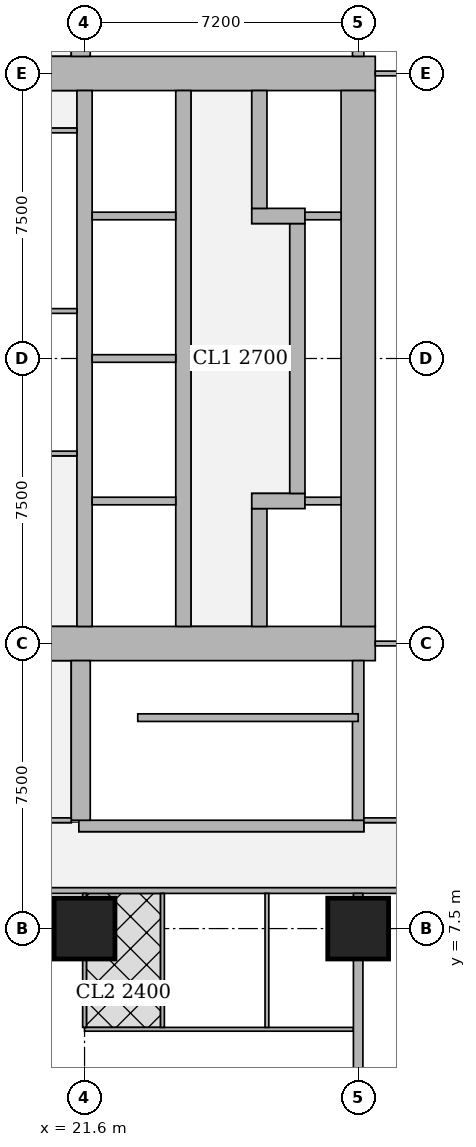
"""IFC4 building model, lengths in metres.
Left out: names, types, materials, properties, quantities, classifications, styles, units other than length and angle.
Written with IfcOpenShell. Run it as: python <this file> out.ifc"""

import sys

from ifc_helpers import new_model, si_unit, direction, frame, frame_2d, origin, origin_2d, place, context, subcontext, project, spatial, rectangle, extrude, element, fill, save


model = new_model("IFC4")
c1 = context("Model", 3, precision=1e-05, world=origin(), true_north=direction((0.0, 1.0)))
c2 = subcontext(c1, "Body", "Model", "MODEL_VIEW")
j1 = project(units=[si_unit("LENGTHUNIT", "METRE"), si_unit("PLANEANGLEUNIT", "RADIAN")], contexts=[c1])
p1 = place(None, origin())
s1 = spatial("IfcSite", under=j1, at=p1, CompositionType="ELEMENT")
p2 = place(p1, origin())
s2 = spatial("IfcBuilding", under=s1, at=p2, CompositionType="ELEMENT")
p3 = place(p2, frame((0.0, 0.0, 111.65)))
s3 = spatial("IfcBuildingStorey", under=s2, at=p3, CompositionType="ELEMENT", Elevation=111.65)
for number, where, z_axis, x_axis in (
    (1, (21.6, 7.5, 0.0), (0.0, 0.0, 1.0), (1.0, 0.0, 0.0)),
    (2, (28.8, 7.5, 0.0), (0.0, 0.0, 1.0), (1.0, 0.0, 0.0)),
):
    element("IfcColumn", number, at=place(p3, frame(where, z_axis=z_axis, x_axis=x_axis)), inside=s3, PredefinedType="COLUMN", context=c2, shape_type="SweptSolid", body=[
        extrude(rectangle(XDim=1.6, YDim=1.6, at=origin_2d()), origin(), (0.0, 0.0, 1.0), 3.75),
    ])
p4 = place(p3, frame((13.95, 15.0, 0.0), z_axis=(0.0, 0.0, 1.0), x_axis=(1.0, 0.0, 0.0)))
e3 = element("IfcWall", 3, at=p4, inside=s3, PredefinedType="SHEAR", context=c2, shape_type="SweptSolid", body=[
    extrude(rectangle(XDim=15.3, YDim=0.9, at=frame_2d((7.65, 0.0))), origin(), (0.0, 0.0, 1.0), 3.75),
])
p5 = place(p4, frame((4.45, 0.0, 0.0)))
e4 = element("IfcOpeningElement", 4, at=p5, cuts=e3, PredefinedType="OPENING", context=c2, shape_type="SweptSolid", body=[
    extrude(rectangle(XDim=1.8, YDim=2.1, at=frame_2d((0.9, 1.05))), frame((0.0, 0.46, 0.0), z_axis=(0.0, -1.0, 0.0), x_axis=(1.0, 0.0, 0.0)), (0.0, 0.0, 1.0), 0.92),
])
p6 = place(p4, frame((10.7, 0.0, 0.0)))
e5 = element("IfcOpeningElement", 5, at=p6, cuts=e3, PredefinedType="OPENING", context=c2, shape_type="SweptSolid", body=[
    extrude(rectangle(XDim=1.1, YDim=2.1, at=frame_2d((0.55, 1.05))), frame((0.0, 0.46, 0.0), z_axis=(0.0, -1.0, 0.0), x_axis=(1.0, 0.0, 0.0)), (0.0, 0.0, 1.0), 0.92),
])
p7 = place(p3, frame((13.95, 30.0, 0.0), z_axis=(0.0, 0.0, 1.0), x_axis=(1.0, 0.0, 0.0)))
e6 = element("IfcWall", 6, at=p7, inside=s3, PredefinedType="SHEAR", context=c2, shape_type="SweptSolid", body=[
    extrude(rectangle(XDim=15.3, YDim=0.9, at=frame_2d((7.65, 0.0))), origin(), (0.0, 0.0, 1.0), 3.75),
])
p8 = place(p7, frame((4.45, 0.0, 0.0)))
e7 = element("IfcOpeningElement", 7, at=p8, cuts=e6, PredefinedType="OPENING", context=c2, shape_type="SweptSolid", body=[
    extrude(rectangle(XDim=1.8, YDim=2.1, at=frame_2d((0.9, 1.05))), frame((0.0, 0.46, 0.0), z_axis=(0.0, -1.0, 0.0), x_axis=(1.0, 0.0, 0.0)), (0.0, 0.0, 1.0), 0.92),
])
p9 = place(p7, frame((10.7, 0.0, 0.0)))
e8 = element("IfcOpeningElement", 8, at=p9, cuts=e6, PredefinedType="OPENING", context=c2, shape_type="SweptSolid", body=[
    extrude(rectangle(XDim=1.1, YDim=2.1, at=frame_2d((0.55, 1.05))), frame((0.0, 0.46, 0.0), z_axis=(0.0, -1.0, 0.0), x_axis=(1.0, 0.0, 0.0)), (0.0, 0.0, 1.0), 0.92),
])
p10 = place(p3, frame((28.8, 15.45, 0.0), z_axis=(0.0, 0.0, 1.0), x_axis=(0.0, 1.0, 0.0)))
e9 = element("IfcWall", 9, at=p10, inside=s3, PredefinedType="SHEAR", context=c2, shape_type="SweptSolid", body=[
    extrude(rectangle(XDim=14.1, YDim=0.9, at=frame_2d((7.05, 0.0))), origin(), (0.0, 0.0, 1.0), 3.75),
])
for number, where, z_axis, x_axis in (
    (10, (21.6, 15.45, 0.0), (0.0, 0.0, 1.0), (0.0, 1.0, 0.0)),
    (11, (24.2, 15.45, 0.0), (0.0, 0.0, 1.0), (0.0, 1.0, 0.0)),
):
    element("IfcWall", number, at=place(p3, frame(where, z_axis=z_axis, x_axis=x_axis)), inside=s3, PredefinedType="SHEAR", context=c2, shape_type="SweptSolid", body=[
        extrude(rectangle(XDim=14.1, YDim=0.4, at=frame_2d((7.05, 0.0))), origin(), (0.0, 0.0, 1.0), 3.75),
    ])
p11 = place(p3, frame((26.2, 15.45, 0.0), z_axis=(0.0, 0.0, 1.0), x_axis=(0.0, 1.0, 0.0)))
e12 = element("IfcWall", 12, at=p11, inside=s3, PredefinedType="SHEAR", context=c2, shape_type="SweptSolid", body=[
    extrude(rectangle(XDim=3.1, YDim=0.4, at=frame_2d((1.55, 0.0))), origin(), (0.0, 0.0, 1.0), 3.75),
])
p12 = place(p11, frame((0.825, 0.0, 0.0)))
e13 = element("IfcOpeningElement", 13, at=p12, cuts=e12, PredefinedType="OPENING", context=c2, shape_type="SweptSolid", body=[
    extrude(rectangle(XDim=1.2, YDim=2.1, at=frame_2d((0.6, 1.05))), frame((0.0, 0.21, 0.0), z_axis=(0.0, -1.0, 0.0), x_axis=(1.0, 0.0, 0.0)), (0.0, 0.0, 1.0), 0.42),
])
p13 = place(p3, frame((26.0, 18.75, 0.0), z_axis=(0.0, 0.0, 1.0), x_axis=(1.0, 0.0, 0.0)))
e14 = element("IfcWall", 14, at=p13, inside=s3, PredefinedType="SHEAR", context=c2, shape_type="SweptSolid", body=[
    extrude(rectangle(XDim=1.4, YDim=0.4, at=frame_2d((0.7, 0.0))), origin(), (0.0, 0.0, 1.0), 3.75),
])
p14 = place(p3, frame((27.2, 18.95, 0.0), z_axis=(0.0, 0.0, 1.0), x_axis=(0.0, 1.0, 0.0)))
e15 = element("IfcWall", 15, at=p14, inside=s3, PredefinedType="SHEAR", context=c2, shape_type="SweptSolid", body=[
    extrude(rectangle(XDim=7.1, YDim=0.4, at=frame_2d((3.55, 0.0))), origin(), (0.0, 0.0, 1.0), 3.75),
])
p15 = place(p3, frame((26.0, 26.25, 0.0), z_axis=(0.0, 0.0, 1.0), x_axis=(1.0, 0.0, 0.0)))
e16 = element("IfcWall", 16, at=p15, inside=s3, PredefinedType="SHEAR", context=c2, shape_type="SweptSolid", body=[
    extrude(rectangle(XDim=1.4, YDim=0.4, at=frame_2d((0.7, 0.0))), origin(), (0.0, 0.0, 1.0), 3.75),
])
p16 = place(p3, frame((26.2, 26.45, 0.0), z_axis=(0.0, 0.0, 1.0), x_axis=(0.0, 1.0, 0.0)))
e17 = element("IfcWall", 17, at=p16, inside=s3, PredefinedType="SHEAR", context=c2, shape_type="SweptSolid", body=[
    extrude(rectangle(XDim=3.1, YDim=0.4, at=frame_2d((1.55, 0.0))), origin(), (0.0, 0.0, 1.0), 3.75),
])
p17 = place(p16, frame((1.075, 0.0, 0.0)))
e18 = element("IfcOpeningElement", 18, at=p17, cuts=e17, PredefinedType="OPENING", context=c2, shape_type="SweptSolid", body=[
    extrude(rectangle(XDim=1.2, YDim=2.1, at=frame_2d((0.6, 1.05))), frame((0.0, 0.21, 0.0), z_axis=(0.0, -1.0, 0.0), x_axis=(1.0, 0.0, 0.0)), (0.0, 0.0, 1.0), 0.42),
])
p18 = place(p3, frame((21.45, 10.2, 0.0), z_axis=(0.0, 0.0, 1.0), x_axis=(1.0, 0.0, 0.0)))
e19 = element("IfcWall", 19, at=p18, inside=s3, PredefinedType="SHEAR", context=c2, shape_type="SweptSolid", body=[
    extrude(rectangle(XDim=7.5, YDim=0.3, at=frame_2d((3.75, 0.0))), origin(), (0.0, 0.0, 1.0), 3.75),
])
p19 = place(p18, frame((0.5, 0.0, 0.0)))
e20 = element("IfcOpeningElement", 20, at=p19, cuts=e19, PredefinedType="OPENING", context=c2, shape_type="SweptSolid", body=[
    extrude(rectangle(XDim=1.1, YDim=2.1, at=frame_2d((0.55, 1.05))), frame((0.0, 0.16, 0.0), z_axis=(0.0, -1.0, 0.0), x_axis=(1.0, 0.0, 0.0)), (0.0, 0.0, 1.0), 0.32),
])
p20 = place(p3, frame((21.5, 10.35, 0.0), z_axis=(0.0, 0.0, 1.0), x_axis=(0.0, 1.0, 0.0)))
e21 = element("IfcWall", 21, at=p20, inside=s3, PredefinedType="SHEAR", context=c2, shape_type="SweptSolid", body=[
    extrude(rectangle(XDim=4.2, YDim=0.5, at=frame_2d((2.1, 0.0))), origin(), (0.0, 0.0, 1.0), 3.75),
])
p21 = place(p3, frame((28.8, 10.35, 0.0), z_axis=(0.0, 0.0, 1.0), x_axis=(0.0, 1.0, 0.0)))
e22 = element("IfcWall", 22, at=p21, inside=s3, PredefinedType="SHEAR", context=c2, shape_type="SweptSolid", body=[
    extrude(rectangle(XDim=4.2, YDim=0.3, at=frame_2d((2.1, 0.0))), origin(), (0.0, 0.0, 1.0), 3.75),
])
p22 = place(p3, frame((21.5, 30.45, 0.0), z_axis=(0.0, 0.0, 1.0), x_axis=(0.0, 1.0, 0.0)))
e23 = element("IfcWall", 23, at=p22, inside=s3, PredefinedType="SHEAR", context=c2, shape_type="SweptSolid", body=[
    extrude(rectangle(XDim=4.2, YDim=0.5, at=frame_2d((2.1, 0.0))), origin(), (0.0, 0.0, 1.0), 3.75),
])
p23 = place(p3, frame((28.8, 30.45, 0.0), z_axis=(0.0, 0.0, 1.0), x_axis=(0.0, 1.0, 0.0)))
e24 = element("IfcWall", 24, at=p23, inside=s3, PredefinedType="SHEAR", context=c2, shape_type="SweptSolid", body=[
    extrude(rectangle(XDim=4.2, YDim=0.3, at=frame_2d((2.1, 0.0))), origin(), (0.0, 0.0, 1.0), 3.75),
])
p24 = place(p3, frame((40.053, 8.5, 0.0), z_axis=(0.0, 0.0, 1.0), x_axis=(-1.0, 0.0, 0.0)))
e25 = element("IfcWall", 25, at=p24, inside=s3, PredefinedType="SOLIDWALL", context=c2, shape_type="SweptSolid", body=[
    extrude(rectangle(XDim=31.703, YDim=0.15, at=frame_2d((15.852, 0.0))), origin(), (0.0, 0.0, 1.0), 3.5),
])
p25 = place(p24, frame((28.103, 0.0, 0.0)))
e26 = element("IfcOpeningElement", 26, at=p25, cuts=e25, PredefinedType="OPENING", context=c2, shape_type="SweptSolid", body=[
    extrude(rectangle(XDim=1.0, YDim=2.1, at=frame_2d((0.5, 1.05))), frame((0.0, 0.085, 0.0), z_axis=(0.0, -1.0, 0.0), x_axis=(1.0, 0.0, 0.0)), (0.0, 0.0, 1.0), 0.17),
])
p26 = place(p24, frame((19.754, 0.0, 0.0)))
e27 = element("IfcOpeningElement", 27, at=p26, cuts=e25, PredefinedType="OPENING", context=c2, shape_type="SweptSolid", body=[
    extrude(rectangle(XDim=1.0, YDim=2.1, at=frame_2d((0.5, 1.05))), frame((0.0, 0.085, 0.0), z_axis=(0.0, -1.0, 0.0), x_axis=(1.0, 0.0, 0.0)), (0.0, 0.0, 1.0), 0.17),
])
p27 = place(p24, frame((8.353, 0.0, 0.0)))
e28 = element("IfcOpeningElement", 28, at=p27, cuts=e25, PredefinedType="OPENING", context=c2, shape_type="SweptSolid", body=[
    extrude(rectangle(XDim=1.0, YDim=2.1, at=frame_2d((0.5, 1.05))), frame((0.0, 0.085, 0.0), z_axis=(0.0, -1.0, 0.0), x_axis=(1.0, 0.0, 0.0)), (0.0, 0.0, 1.0), 0.17),
])
p28 = place(p3, frame((28.675, 4.85, 0.0), z_axis=(0.0, 0.0, 1.0), x_axis=(-1.0, 0.0, 0.0)))
e29 = element("IfcWall", 29, at=p28, inside=s3, PredefinedType="PARTITIONING", context=c2, shape_type="SweptSolid", body=[
    extrude(rectangle(XDim=7.075, YDim=0.1, at=frame_2d((3.538, 0.0))), origin(), (0.0, 0.0, 1.0), 3.5),
])
p29 = place(p28, frame((5.6, 0.0, 0.0)))
e30 = element("IfcOpeningElement", 30, at=p29, cuts=e29, PredefinedType="OPENING", context=c2, shape_type="SweptSolid", body=[
    extrude(rectangle(XDim=0.9, YDim=2.1, at=frame_2d((0.45, 1.05))), frame((0.0, 0.06, 0.0), z_axis=(0.0, -1.0, 0.0), x_axis=(1.0, 0.0, 0.0)), (0.0, 0.0, 1.0), 0.12),
])
p30 = place(p28, frame((0.626, 0.0, 0.0)))
e31 = element("IfcOpeningElement", 31, at=p30, cuts=e29, PredefinedType="OPENING", context=c2, shape_type="SweptSolid", body=[
    extrude(rectangle(XDim=0.9, YDim=2.1, at=frame_2d((0.45, 1.05))), frame((0.0, 0.06, 0.0), z_axis=(0.0, -1.0, 0.0), x_axis=(1.0, 0.0, 0.0)), (0.0, 0.0, 1.0), 0.12),
])
p31 = place(p28, frame((3.201, 0.0, 0.0)))
e32 = element("IfcOpeningElement", 32, at=p31, cuts=e29, PredefinedType="OPENING", context=c2, shape_type="SweptSolid", body=[
    extrude(rectangle(XDim=0.9, YDim=2.1, at=frame_2d((0.45, 1.05))), frame((0.0, 0.06, 0.0), z_axis=(0.0, -1.0, 0.0), x_axis=(1.0, 0.0, 0.0)), (0.0, 0.0, 1.0), 0.12),
])
p32 = place(p3, frame((21.6, 4.9, 0.0), z_axis=(0.0, 0.0, 1.0), x_axis=(0.0, 1.0, 0.0)))
e33 = element("IfcWall", 33, at=p32, inside=s3, PredefinedType="PARTITIONING", context=c2, shape_type="SweptSolid", body=[
    extrude(rectangle(XDim=1.799, YDim=0.1, at=frame_2d((0.899, 0.0))), origin(), (0.0, 0.0, 1.0), 3.5),
])
p33 = place(p3, frame((21.6, 8.301, 0.0), z_axis=(0.0, 0.0, 1.0), x_axis=(0.0, 1.0, 0.0)))
e34 = element("IfcWall", 34, at=p33, inside=s3, PredefinedType="PARTITIONING", context=c2, shape_type="SweptSolid", body=[
    extrude(rectangle(XDim=0.124, YDim=0.1, at=frame_2d((0.062, 0.0))), origin(), (0.0, 0.0, 1.0), 3.5),
])
for number, where, z_axis, x_axis in (
    (35, (26.399, 4.9, 0.0), (0.0, 0.0, 1.0), (0.0, 1.0, 0.0)),
    (36, (23.65, 4.9, 0.0), (0.0, 0.0, 1.0), (0.0, 1.0, 0.0)),
):
    element("IfcWall", number, at=place(p3, frame(where, z_axis=z_axis, x_axis=x_axis)), inside=s3, PredefinedType="PARTITIONING", context=c2, shape_type="SweptSolid", body=[
        extrude(rectangle(XDim=3.525, YDim=0.1, at=frame_2d((1.763, 0.0))), origin(), (0.0, 0.0, 1.0), 3.5),
    ])
p34 = place(p3, frame((28.8, 3.65, 0.0), z_axis=(0.0, 0.0, 1.0), x_axis=(0.0, 1.0, 0.0)))
e37 = element("IfcWall", 37, at=p34, inside=s3, PredefinedType="SOLIDWALL", context=c2, shape_type="SweptSolid", body=[
    extrude(rectangle(XDim=3.049, YDim=0.25, at=frame_2d((1.524, 0.0))), origin(), (0.0, 0.0, 1.0), 3.5),
])
p35 = place(p3, frame((28.8, 8.301, 0.0), z_axis=(0.0, 0.0, 1.0), x_axis=(0.0, 1.0, 0.0)))
e38 = element("IfcWall", 38, at=p35, inside=s3, PredefinedType="SOLIDWALL", context=c2, shape_type="SweptSolid", body=[
    extrude(rectangle(XDim=0.124, YDim=0.25, at=frame_2d((0.062, 0.0))), origin(), (0.0, 0.0, 1.0), 3.5),
])
p36 = place(p3, frame((10.413, 10.35, 0.0), z_axis=(0.0, 0.0, 1.0), x_axis=(1.0, 0.0, 0.0)))
e39 = element("IfcWall", 39, at=p36, inside=s3, PredefinedType="PARTITIONING", context=c2, shape_type="SweptSolid", body=[
    extrude(rectangle(XDim=10.837, YDim=0.125, at=frame_2d((5.418, 0.0))), origin(), (0.0, 0.0, 1.0), 3.5),
])
p37 = place(p36, frame((7.582, 0.0, 0.0)))
e40 = element("IfcOpeningElement", 40, at=p37, cuts=e39, PredefinedType="OPENING", context=c2, shape_type="SweptSolid", body=[
    extrude(rectangle(XDim=1.8, YDim=2.1, at=frame_2d((0.9, 1.05))), frame((0.0, 0.073, 0.0), z_axis=(0.0, -1.0, 0.0), x_axis=(1.0, 0.0, 0.0)), (0.0, 0.0, 1.0), 0.145),
])
p38 = place(p3, frame((28.95, 10.35, 0.0), z_axis=(0.0, 0.0, 1.0), x_axis=(1.0, 0.0, 0.0)))
e41 = element("IfcWall", 41, at=p38, inside=s3, PredefinedType="PARTITIONING", context=c2, shape_type="SweptSolid", body=[
    extrude(rectangle(XDim=8.886, YDim=0.125, at=frame_2d((4.443, 0.0))), origin(), (0.0, 0.0, 1.0), 3.5),
])
p39 = place(p3, frame((29.25, 15.0, 0.0), z_axis=(0.0, 0.0, 1.0), x_axis=(1.0, 0.0, 0.0)))
e42 = element("IfcWall", 42, at=p39, inside=s3, PredefinedType="PARTITIONING", context=c2, shape_type="SweptSolid", body=[
    extrude(rectangle(XDim=5.949, YDim=0.125, at=frame_2d((2.975, 0.0))), origin(), (0.0, 0.0, 1.0), 3.5),
])
p40 = place(p3, frame((29.25, 30.0, 0.0), z_axis=(0.0, 0.0, 1.0), x_axis=(1.0, 0.0, 0.0)))
e43 = element("IfcWall", 43, at=p40, inside=s3, PredefinedType="PARTITIONING", context=c2, shape_type="SweptSolid", body=[
    extrude(rectangle(XDim=2.949, YDim=0.125, at=frame_2d((1.475, 0.0))), origin(), (0.0, 0.0, 1.0), 3.5),
])
for number, where, z_axis, x_axis in (
    (44, (20.663, 20.0, 0.0), (0.0, 0.0, 1.0), (1.0, 0.0, 0.0)),
    (45, (20.663, 28.5, 0.0), (0.0, 0.0, 1.0), (1.0, 0.0, 0.0)),
    (46, (20.663, 23.75, 0.0), (0.0, 0.0, 1.0), (1.0, 0.0, 0.0)),
):
    element("IfcWall", number, at=place(p3, frame(where, z_axis=z_axis, x_axis=x_axis)), inside=s3, PredefinedType="PARTITIONING", context=c2, shape_type="SweptSolid", body=[
        extrude(rectangle(XDim=0.737, YDim=0.125, at=frame_2d((0.368, 0.0))), origin(), (0.0, 0.0, 1.0), 3.5),
    ])
p41 = place(p3, frame((23.0, 13.05, 0.0), z_axis=(0.0, 0.0, 1.0), x_axis=(1.0, 0.0, 0.0)))
e47 = element("IfcWall", 47, at=p41, inside=s3, PredefinedType="SHEAR", context=c2, shape_type="SweptSolid", body=[
    extrude(rectangle(XDim=5.8, YDim=0.2, at=frame_2d((2.9, 0.0))), origin(), (0.0, 0.0, 1.0), 3.75),
])
for number, where, z_axis, x_axis in (
    (48, (21.8, 18.75, 0.0), (0.0, 0.0, 1.0), (1.0, 0.0, 0.0)),
    (49, (21.8, 22.5, 0.0), (0.0, 0.0, 1.0), (1.0, 0.0, 0.0)),
    (50, (21.8, 26.25, 0.0), (0.0, 0.0, 1.0), (1.0, 0.0, 0.0)),
):
    element("IfcWall", number, at=place(p3, frame(where, z_axis=z_axis, x_axis=x_axis)), inside=s3, PredefinedType="SOLIDWALL", context=c2, shape_type="SweptSolid", body=[
        extrude(rectangle(XDim=2.2, YDim=0.2, at=frame_2d((1.1, 0.0))), origin(), (0.0, 0.0, 1.0), 3.5),
    ])
for number, where, z_axis, x_axis in (
    (51, (27.4, 18.75, 0.0), (0.0, 0.0, 1.0), (1.0, 0.0, 0.0)),
    (52, (27.4, 26.25, 0.0), (0.0, 0.0, 1.0), (1.0, 0.0, 0.0)),
):
    element("IfcWall", number, at=place(p3, frame(where, z_axis=z_axis, x_axis=x_axis)), inside=s3, PredefinedType="SOLIDWALL", context=c2, shape_type="SweptSolid", body=[
        extrude(rectangle(XDim=0.95, YDim=0.2, at=frame_2d((0.475, 0.0))), origin(), (0.0, 0.0, 1.0), 3.5),
    ])
p42 = place(p29, origin())
e53 = element("IfcDoor", 53, at=p42, inside=s3, OperationType="SINGLE_SWING_LEFT", PredefinedType="DOOR", context=c2, shape_type="SweptSolid", body=[
    extrude(rectangle(XDim=0.9, YDim=2.1, at=frame_2d((0.45, 1.05))), frame((0.0, 0.025, 0.0), z_axis=(0.0, -1.0, 0.0), x_axis=(1.0, 0.0, 0.0)), (0.0, 0.0, 1.0), 0.05),
])
fill(e30, e53)
p43 = place(p30, origin())
e54 = element("IfcDoor", 54, at=p43, inside=s3, OperationType="SINGLE_SWING_RIGHT", PredefinedType="DOOR", context=c2, shape_type="SweptSolid", body=[
    extrude(rectangle(XDim=0.9, YDim=2.1, at=frame_2d((0.45, 1.05))), frame((0.0, 0.025, 0.0), z_axis=(0.0, -1.0, 0.0), x_axis=(1.0, 0.0, 0.0)), (0.0, 0.0, 1.0), 0.05),
])
fill(e31, e54)
p44 = place(p31, origin())
e55 = element("IfcDoor", 55, at=p44, inside=s3, OperationType="SINGLE_SWING_RIGHT", PredefinedType="DOOR", context=c2, shape_type="SweptSolid", body=[
    extrude(rectangle(XDim=0.9, YDim=2.1, at=frame_2d((0.45, 1.05))), frame((0.0, 0.025, 0.0), z_axis=(0.0, -1.0, 0.0), x_axis=(1.0, 0.0, 0.0)), (0.0, 0.0, 1.0), 0.05),
])
fill(e32, e55)
p45 = place(p6, origin())
e56 = element("IfcDoor", 56, at=p45, inside=s3, OperationType="SINGLE_SWING_RIGHT", PredefinedType="DOOR", context=c2, shape_type="SweptSolid", body=[
    extrude(rectangle(XDim=1.1, YDim=2.1, at=frame_2d((0.55, 1.05))), frame((0.0, 0.025, 0.0), z_axis=(0.0, -1.0, 0.0), x_axis=(1.0, 0.0, 0.0)), (0.0, 0.0, 1.0), 0.05),
])
fill(e5, e56)
p46 = place(p9, origin())
e57 = element("IfcDoor", 57, at=p46, inside=s3, OperationType="SINGLE_SWING_RIGHT", PredefinedType="DOOR", context=c2, shape_type="SweptSolid", body=[
    extrude(rectangle(XDim=1.1, YDim=2.1, at=frame_2d((0.55, 1.05))), frame((0.0, 0.025, 0.0), z_axis=(0.0, -1.0, 0.0), x_axis=(1.0, 0.0, 0.0)), (0.0, 0.0, 1.0), 0.05),
])
fill(e8, e57)
p47 = place(p12, origin())
e58 = element("IfcDoor", 58, at=p47, inside=s3, OperationType="DOUBLE_DOOR_SLIDING", PredefinedType="DOOR", context=c2, shape_type="SweptSolid", body=[
    extrude(rectangle(XDim=1.2, YDim=2.1, at=frame_2d((0.6, 1.05))), frame((0.0, 0.025, 0.0), z_axis=(0.0, -1.0, 0.0), x_axis=(1.0, 0.0, 0.0)), (0.0, 0.0, 1.0), 0.05),
])
fill(e13, e58)
p48 = place(p17, origin())
e59 = element("IfcDoor", 59, at=p48, inside=s3, OperationType="DOUBLE_DOOR_SLIDING", PredefinedType="DOOR", context=c2, shape_type="SweptSolid", body=[
    extrude(rectangle(XDim=1.2, YDim=2.1, at=frame_2d((0.6, 1.05))), frame((0.0, 0.025, 0.0), z_axis=(0.0, -1.0, 0.0), x_axis=(1.0, 0.0, 0.0)), (0.0, 0.0, 1.0), 0.05),
])
fill(e18, e59)
p49 = place(p19, origin())
e60 = element("IfcDoor", 60, at=p49, inside=s3, OperationType="SINGLE_SWING_LEFT", PredefinedType="DOOR", context=c2, shape_type="SweptSolid", body=[
    extrude(rectangle(XDim=1.1, YDim=2.1, at=frame_2d((0.55, 1.05))), frame((0.0, 0.025, 0.0), z_axis=(0.0, -1.0, 0.0), x_axis=(1.0, 0.0, 0.0)), (0.0, 0.0, 1.0), 0.05),
])
fill(e20, e60)
save(model, sys.argv[1])
